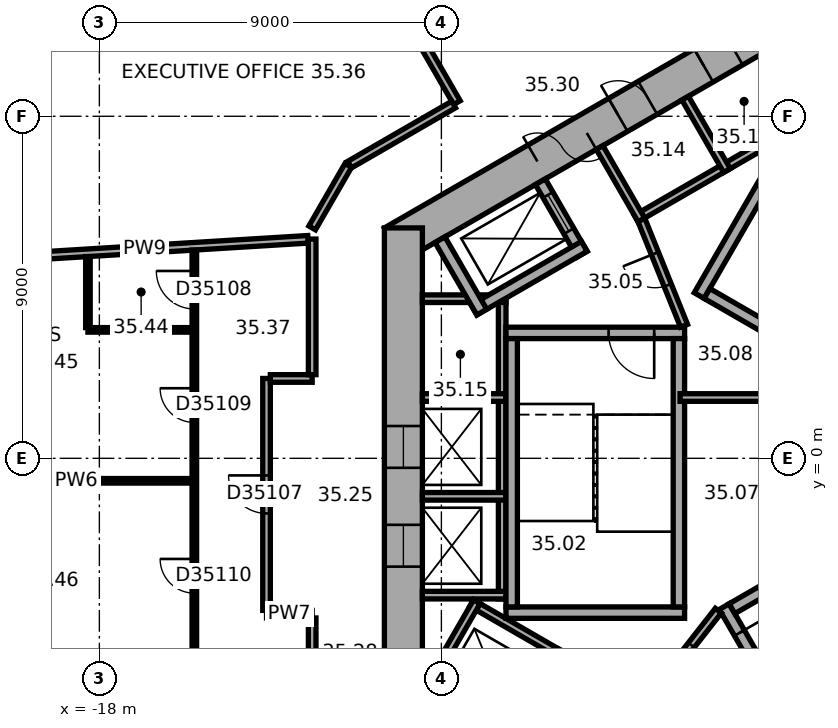
"""IFC4 building model, lengths in metres.
Left out: names, types, materials, properties, quantities, classifications, styles, units other than length and angle.
Written with IfcOpenShell. Run it as: python <this file> out.ifc"""

import sys

from ifc_helpers import new_model, si_unit, direction, frame, frame_2d, origin, place, context, subcontext, project, spatial, rectangle, extrude, element, fill, save


model = new_model("IFC4")
c1 = context("Model", 3, precision=1e-05, world=origin(), true_north=direction((0.0, 1.0)))
c2 = subcontext(c1, "Body", "Model", "MODEL_VIEW")
j1 = project(units=[si_unit("LENGTHUNIT", "METRE"), si_unit("PLANEANGLEUNIT", "RADIAN")], contexts=[c1])
p1 = place(None, origin())
s1 = spatial("IfcSite", under=j1, at=p1, CompositionType="ELEMENT")
p2 = place(p1, origin())
s2 = spatial("IfcBuilding", under=s1, at=p2, CompositionType="ELEMENT")
p3 = place(p2, frame((0.0, 0.0, 146.6)))
s3 = spatial("IfcBuildingStorey", under=s2, at=p3, CompositionType="ELEMENT", Elevation=146.6)
p4 = place(p3, frame((0.25, 11.691, 0.0), z_axis=(0.0, 0.0, 1.0), x_axis=(-0.866022616891, -0.50000482701, 0.0)))
e1 = element("IfcWall", 1, at=p4, inside=s3, PredefinedType="SHEAR", context=c2, shape_type="SweptSolid", body=[
    extrude(rectangle(XDim=12.125, YDim=1.0, at=frame_2d((6.062, 0.0))), origin(), (0.0, 0.0, 1.0), 3.7),
])
p5 = place(p4, frame((6.262, 0.0, 0.0)))
e2 = element("IfcOpeningElement", 2, at=p5, cuts=e1, PredefinedType="OPENING", context=c2, shape_type="SweptSolid", body=[
    extrude(rectangle(XDim=1.5, YDim=2.1, at=frame_2d((0.75, 1.05))), frame((0.0, 0.51, 0.0), z_axis=(0.0, -1.0, 0.0), x_axis=(1.0, 0.0, 0.0)), (0.0, 0.0, 1.0), 1.02),
])
p6 = place(p4, frame((1.812, 0.0, 0.0)))
e3 = element("IfcOpeningElement", 3, at=p6, cuts=e1, PredefinedType="OPENING", context=c2, shape_type="SweptSolid", body=[
    extrude(rectangle(XDim=0.9, YDim=2.1, at=frame_2d((0.45, 1.05))), frame((0.0, 0.51, 0.0), z_axis=(0.0, -1.0, 0.0), x_axis=(1.0, 0.0, 0.0)), (0.0, 0.0, 1.0), 1.02),
])
p7 = place(p4, frame((4.412, 0.0, 0.0)))
e4 = element("IfcOpeningElement", 4, at=p7, cuts=e1, PredefinedType="OPENING", context=c2, shape_type="SweptSolid", body=[
    extrude(rectangle(XDim=0.9, YDim=2.1, at=frame_2d((0.45, 1.05))), frame((0.0, 0.51, 0.0), z_axis=(0.0, -1.0, 0.0), x_axis=(1.0, 0.0, 0.0)), (0.0, 0.0, 1.0), 1.02),
])
p8 = place(p3, frame((-10.0, 6.062, 0.0), z_axis=(0.0, 0.0, 1.0), x_axis=(0.0, -1.0, 0.0)))
e5 = element("IfcWall", 5, at=p8, inside=s3, PredefinedType="SHEAR", context=c2, shape_type="SweptSolid", body=[
    extrude(rectangle(XDim=12.125, YDim=1.0, at=frame_2d((6.062, 0.0))), origin(), (0.0, 0.0, 1.0), 3.7),
])
p9 = place(p8, frame((5.212, 0.0, 0.0)))
e6 = element("IfcOpeningElement", 6, at=p9, cuts=e5, PredefinedType="OPENING", context=c2, shape_type="SweptSolid", body=[
    extrude(rectangle(XDim=1.1, YDim=2.1, at=frame_2d((0.55, 1.05))), frame((0.0, 0.51, 0.0), z_axis=(0.0, -1.0, 0.0), x_axis=(1.0, 0.0, 0.0)), (0.0, 0.0, 1.0), 1.02),
])
p10 = place(p8, frame((7.812, 0.0, 0.0)))
e7 = element("IfcOpeningElement", 7, at=p10, cuts=e5, PredefinedType="OPENING", context=c2, shape_type="SweptSolid", body=[
    extrude(rectangle(XDim=1.1, YDim=2.1, at=frame_2d((0.55, 1.05))), frame((0.0, 0.51, 0.0), z_axis=(0.0, -1.0, 0.0), x_axis=(1.0, 0.0, 0.0)), (0.0, 0.0, 1.0), 1.02),
])
p11 = place(p3, frame((0.803, 9.009, 0.0), z_axis=(0.0, 0.0, 1.0), x_axis=(-0.866028230842, -0.499995103361, 0.0)))
e8 = element("IfcWall", 8, at=p11, inside=s3, PredefinedType="PARTITIONING", context=c2, shape_type="SweptSolid", body=[
    extrude(rectangle(XDim=5.4, YDim=0.2, at=frame_2d((2.7, 0.0))), origin(), (0.0, 0.0, 1.0), 3.42),
])
for number, where, z_axis, x_axis in (
    (9, (-1.485, 7.572, 0.0), (0.0, 0.0, 1.0), (-0.5, 0.866, 0.0)),
    (10, (-3.737, 6.272, 0.0), (0.0, 0.0, 1.0), (-0.5, 0.866, 0.0)),
):
    element("IfcWall", number, at=place(p3, frame(where, z_axis=z_axis, x_axis=x_axis)), inside=s3, PredefinedType="PARTITIONING", context=c2, shape_type="SweptSolid", body=[
        extrude(rectangle(XDim=2.2, YDim=0.2, at=frame_2d((1.1, 0.0))), origin(), (0.0, 0.0, 1.0), 3.42),
    ])
p12 = place(p3, frame((-7.4, 4.3, 0.0), z_axis=(0.0, 0.0, 1.0), x_axis=(0.0, -1.0, 0.0)))
e11 = element("IfcWall", 11, at=p12, inside=s3, PredefinedType="PARTITIONING", context=c2, shape_type="SweptSolid", body=[
    extrude(rectangle(XDim=8.0, YDim=0.2, at=frame_2d((4.0, 0.0))), origin(), (0.0, 0.0, 1.0), 3.42),
])
for number, where, z_axis, x_axis in (
    (12, (-7.3, 4.2, 0.0), (0.0, 0.0, 1.0), (-1.0, 0.0, 0.0)),
    (13, (-7.3, 1.6, 0.0), (0.0, 0.0, 1.0), (-1.0, 0.0, 0.0)),
    (14, (-7.3, -1.0, 0.0), (0.0, 0.0, 1.0), (-1.0, 0.0, 0.0)),
    (15, (-7.3, -3.6, 0.0), (0.0, 0.0, 1.0), (-1.0, 0.0, 0.0)),
):
    element("IfcWall", number, at=place(p3, frame(where, z_axis=z_axis, x_axis=x_axis)), inside=s3, PredefinedType="PARTITIONING", context=c2, shape_type="SweptSolid", body=[
        extrude(rectangle(XDim=2.2, YDim=0.2, at=frame_2d((1.1, 0.0))), origin(), (0.0, 0.0, 1.0), 3.42),
    ])
p13 = place(p3, frame((-8.203, -3.809, 0.0), z_axis=(0.0, 0.0, 1.0), x_axis=(0.866028230842, -0.499995103361, 0.0)))
e16 = element("IfcWall", 16, at=p13, inside=s3, PredefinedType="PARTITIONING", context=c2, shape_type="SweptSolid", body=[
    extrude(rectangle(XDim=5.4, YDim=0.2, at=frame_2d((2.7, 0.0))), origin(), (0.0, 0.0, 1.0), 3.42),
])
p14 = place(p3, frame((-8.067, -3.772, 0.0), z_axis=(0.0, 0.0, 1.0), x_axis=(-0.50002983664, -0.866008176907, 0.0)))
e17 = element("IfcWall", 17, at=p14, inside=s3, PredefinedType="PARTITIONING", context=c2, shape_type="SweptSolid", body=[
    extrude(rectangle(XDim=2.2, YDim=0.2, at=frame_2d((1.1, 0.0))), origin(), (0.0, 0.0, 1.0), 3.42),
])
p15 = place(p3, frame((-2.216, 4.282, 0.0), z_axis=(0.0, 0.0, 1.0), x_axis=(0.499977259774, 0.866038532462, 0.0)))
e18 = element("IfcWall", 18, at=p15, inside=s3, PredefinedType="SHEAR", context=c2, shape_type="SweptSolid", body=[
    extrude(rectangle(XDim=4.7, YDim=0.3, at=frame_2d((2.35, 0.0))), origin(), (0.0, 0.0, 1.0), 3.42),
])
p16 = place(p3, frame((4.103, 0.807, 0.0), z_axis=(0.0, 0.0, 1.0), x_axis=(-0.866027801685, 0.499995846692, 0.0)))
e19 = element("IfcWall", 19, at=p16, inside=s3, PredefinedType="SHEAR", context=c2, shape_type="SweptSolid", body=[
    extrude(rectangle(XDim=7.06, YDim=0.3, at=frame_2d((3.53, 0.0))), origin(), (0.0, 0.0, 1.0), 3.42),
])
p17 = place(p3, frame((-2.6, 3.3, 0.0), z_axis=(0.0, 0.0, 1.0), x_axis=(-1.0, 0.0, 0.0)))
e20 = element("IfcWall", 20, at=p17, inside=s3, PredefinedType="SHEAR", context=c2, shape_type="SweptSolid", body=[
    extrude(rectangle(XDim=4.7, YDim=0.3, at=frame_2d((2.35, 0.0))), origin(), (0.0, 0.0, 1.0), 3.42),
])
p18 = place(p17, frame((0.8, 0.0, 0.0)))
e21 = element("IfcOpeningElement", 21, at=p18, cuts=e20, PredefinedType="OPENING", context=c2, shape_type="SweptSolid", body=[
    extrude(rectangle(XDim=1.2, YDim=2.1, at=frame_2d((0.6, 1.05))), frame((0.0, 0.16, 0.0), z_axis=(0.0, -1.0, 0.0), x_axis=(1.0, 0.0, 0.0)), (0.0, 0.0, 1.0), 0.32),
])
p19 = place(p3, frame((-2.6, -4.06, 0.0), z_axis=(0.0, 0.0, 1.0), x_axis=(-1.0, 0.0, 0.0)))
e22 = element("IfcWall", 22, at=p19, inside=s3, PredefinedType="SHEAR", context=c2, shape_type="SweptSolid", body=[
    extrude(rectangle(XDim=4.7, YDim=0.3, at=frame_2d((2.35, 0.0))), origin(), (0.0, 0.0, 1.0), 3.42),
])
for number, where, z_axis, x_axis in (
    (23, (-2.75, 3.15, 0.0), (0.0, 0.0, 1.0), (0.0, -1.0, 0.0)),
    (24, (-7.15, 3.15, 0.0), (0.0, 0.0, 1.0), (0.0, -1.0, 0.0)),
):
    element("IfcWall", number, at=place(p3, frame(where, z_axis=z_axis, x_axis=x_axis)), inside=s3, PredefinedType="SHEAR", context=c2, shape_type="SweptSolid", body=[
        extrude(rectangle(XDim=7.06, YDim=0.3, at=frame_2d((3.53, 0.0))), origin(), (0.0, 0.0, 1.0), 3.42),
    ])
p20 = place(p3, frame((-1.558, -3.902, 0.0), z_axis=(0.0, 0.0, 1.0), x_axis=(0.499977259774, -0.866038532462, 0.0)))
e25 = element("IfcWall", 25, at=p20, inside=s3, PredefinedType="SHEAR", context=c2, shape_type="SweptSolid", body=[
    extrude(rectangle(XDim=4.7, YDim=0.3, at=frame_2d((2.35, 0.0))), origin(), (0.0, 0.0, 1.0), 3.42),
])
p21 = place(p20, frame((0.8, 0.0, 0.0)))
e26 = element("IfcOpeningElement", 26, at=p21, cuts=e25, PredefinedType="OPENING", context=c2, shape_type="SweptSolid", body=[
    extrude(rectangle(XDim=1.2, YDim=2.1, at=frame_2d((0.6, 1.05))), frame((0.0, 0.16, 0.0), z_axis=(0.0, -1.0, 0.0), x_axis=(1.0, 0.0, 0.0)), (0.0, 0.0, 1.0), 0.32),
])
p22 = place(p3, frame((-1.353, -3.957, 0.0), z_axis=(0.0, 0.0, 1.0), x_axis=(0.866027801685, 0.499995846692, 0.0)))
e27 = element("IfcWall", 27, at=p22, inside=s3, PredefinedType="SHEAR", context=c2, shape_type="SweptSolid", body=[
    extrude(rectangle(XDim=7.06, YDim=0.3, at=frame_2d((3.53, 0.0))), origin(), (0.0, 0.0, 1.0), 3.42),
])
p23 = place(p3, frame((-5.295, 5.372, 0.0), z_axis=(0.0, 0.0, 1.0), x_axis=(-0.500077893725, 0.86598042715, 0.0)))
e28 = element("IfcWall", 28, at=p23, inside=s3, PredefinedType="SHEAR", context=c2, shape_type="SweptSolid", body=[
    extrude(rectangle(XDim=2.2, YDim=0.3, at=frame_2d((1.1, 0.0))), origin(), (0.0, 0.0, 1.0), 3.42),
])
p24 = place(p23, frame((0.7, 0.0, 0.0)))
e29 = element("IfcOpeningElement", 29, at=p24, cuts=e28, PredefinedType="OPENING", context=c2, shape_type="SweptSolid", body=[
    extrude(rectangle(XDim=1.1, YDim=2.1, at=frame_2d((0.55, 1.05))), frame((0.0, 0.16, 0.0), z_axis=(0.0, -1.0, 0.0), x_axis=(1.0, 0.0, 0.0)), (0.0, 0.0, 1.0), 0.32),
])
p25 = place(p3, frame((-5.24, 5.577, 0.0), z_axis=(0.0, 0.0, 1.0), x_axis=(-0.866014461049, -0.500018952895, 0.0)))
e30 = element("IfcWall", 30, at=p25, inside=s3, PredefinedType="SHEAR", context=c2, shape_type="SweptSolid", body=[
    extrude(rectangle(XDim=3.35, YDim=0.3, at=frame_2d((1.675, 0.0))), origin(), (0.0, 0.0, 1.0), 3.42),
])
p26 = place(p3, frame((-7.937, 3.847, 0.0), z_axis=(0.0, 0.0, 1.0), x_axis=(-0.50002983664, 0.866008176907, 0.0)))
e31 = element("IfcWall", 31, at=p26, inside=s3, PredefinedType="SHEAR", context=c2, shape_type="SweptSolid", body=[
    extrude(rectangle(XDim=2.2, YDim=0.3, at=frame_2d((1.1, 0.0))), origin(), (0.0, 0.0, 1.0), 3.42),
])
p27 = place(p3, frame((-2.615, 3.487, 0.0), z_axis=(0.0, 0.0, 1.0), x_axis=(-0.373576831041, 0.92759924068, 0.0)))
e32 = element("IfcWall", 32, at=p27, inside=s3, PredefinedType="PARTITIONING", context=c2, shape_type="SweptSolid", body=[
    extrude(rectangle(XDim=3.002, YDim=0.2, at=frame_2d((1.501, 0.0))), origin(), (0.0, 0.0, 1.0), 3.42),
])
p28 = place(p27, frame((1.15, 0.0, 0.0)))
e33 = element("IfcOpeningElement", 33, at=p28, cuts=e32, PredefinedType="OPENING", context=c2, shape_type="SweptSolid", body=[
    extrude(rectangle(XDim=0.9, YDim=2.1, at=frame_2d((0.45, 1.05))), frame((0.0, 0.11, 0.0), z_axis=(0.0, -1.0, 0.0), x_axis=(1.0, 0.0, 0.0)), (0.0, 0.0, 1.0), 0.22),
])
p29 = place(p3, frame((-1.712, -4.008, 0.0), z_axis=(0.0, 0.0, 1.0), x_axis=(-0.616549420702, -0.787316208287, 0.0)))
e34 = element("IfcWall", 34, at=p29, inside=s3, PredefinedType="PARTITIONING", context=c2, shape_type="SweptSolid", body=[
    extrude(rectangle(XDim=3.002, YDim=0.2, at=frame_2d((1.501, 0.0))), origin(), (0.0, 0.0, 1.0), 3.42),
])
p30 = place(p29, frame((1.15, 0.0, 0.0)))
e35 = element("IfcOpeningElement", 35, at=p30, cuts=e34, PredefinedType="OPENING", context=c2, shape_type="SweptSolid", body=[
    extrude(rectangle(XDim=0.9, YDim=2.1, at=frame_2d((0.45, 1.05))), frame((0.0, 0.11, 0.0), z_axis=(0.0, -1.0, 0.0), x_axis=(1.0, 0.0, 0.0)), (0.0, 0.0, 1.0), 0.22),
])
p31 = place(p3, frame((-2.72, 1.6, 0.0), z_axis=(0.0, 0.0, 1.0), x_axis=(1.0, 0.0, 0.0)))
e36 = element("IfcWall", 36, at=p31, inside=s3, PredefinedType="PARTITIONING", context=c2, shape_type="SweptSolid", body=[
    extrude(rectangle(XDim=5.269, YDim=0.2, at=frame_2d((2.634, 0.0))), origin(), (0.0, 0.0, 1.0), 3.42),
])
p32 = place(p3, frame((-21.654, -0.592, 0.0), z_axis=(0.0, 0.0, 1.0), x_axis=(1.0, 0.0, 0.0)))
e37 = element("IfcWall", 37, at=p32, inside=s3, PredefinedType="PARTITIONING", context=c2, shape_type="SweptSolid", body=[
    extrude(rectangle(XDim=6.093, YDim=0.12, at=frame_2d((3.046, 0.0))), origin(), (0.0, 0.0, 1.0), 3.42),
])
p33 = place(p3, frame((-21.109, 5.237, 0.0), z_axis=(0.0, 0.0, 1.0), x_axis=(0.998135264293, 0.061040922131, 0.0)))
e38 = element("IfcWall", 38, at=p33, inside=s3, PredefinedType="PARTITIONING", context=c2, shape_type="SweptSolid", body=[
    extrude(rectangle(XDim=8.615, YDim=0.2, at=frame_2d((4.308, 0.0))), origin(), (0.0, 0.0, 1.0), 3.42),
])
p34 = place(p3, frame((-18.301, 3.38, 0.0), z_axis=(0.0, 0.0, 1.0), x_axis=(1.0, 0.0, 0.0)))
e39 = element("IfcWall", 39, at=p34, inside=s3, PredefinedType="PARTITIONING", context=c2, shape_type="SweptSolid", body=[
    extrude(rectangle(XDim=2.74, YDim=0.12, at=frame_2d((1.37, 0.0))), origin(), (0.0, 0.0, 1.0), 3.42),
])
p35 = place(p3, frame((-18.301, 5.308, 0.0), z_axis=(0.0, 0.0, 1.0), x_axis=(0.0, -1.0, 0.0)))
e40 = element("IfcWall", 40, at=p35, inside=s3, PredefinedType="PARTITIONING", context=c2, shape_type="SweptSolid", body=[
    extrude(rectangle(XDim=1.869, YDim=0.12, at=frame_2d((0.934, 0.0))), origin(), (0.0, 0.0, 1.0), 3.42),
])
p36 = place(p3, frame((-15.501, 5.479, 0.0), z_axis=(0.0, 0.0, 1.0), x_axis=(0.0, -1.0, 0.0)))
e41 = element("IfcWall", 41, at=p36, inside=s3, PredefinedType="PARTITIONING", context=c2, shape_type="SweptSolid", body=[
    extrude(rectangle(XDim=11.083, YDim=0.12, at=frame_2d((5.542, 0.0))), origin(), (0.0, 0.0, 1.0), 3.42),
])
p37 = place(p36, frame((0.55, 0.0, 0.0)))
e42 = element("IfcOpeningElement", 42, at=p37, cuts=e41, PredefinedType="OPENING", context=c2, shape_type="SweptSolid", body=[
    extrude(rectangle(XDim=1.0, YDim=2.1, at=frame_2d((0.5, 1.05))), frame((0.0, 0.07, 0.0), z_axis=(0.0, -1.0, 0.0), x_axis=(1.0, 0.0, 0.0)), (0.0, 0.0, 1.0), 0.14),
])
p38 = place(p36, frame((3.636, 0.0, 0.0)))
e43 = element("IfcOpeningElement", 43, at=p38, cuts=e41, PredefinedType="OPENING", context=c2, shape_type="SweptSolid", body=[
    extrude(rectangle(XDim=0.9, YDim=2.1, at=frame_2d((0.45, 1.05))), frame((0.0, 0.07, 0.0), z_axis=(0.0, -1.0, 0.0), x_axis=(1.0, 0.0, 0.0)), (0.0, 0.0, 1.0), 0.14),
])
p39 = place(p36, frame((8.127, 0.0, 0.0)))
e44 = element("IfcOpeningElement", 44, at=p39, cuts=e41, PredefinedType="OPENING", context=c2, shape_type="SweptSolid", body=[
    extrude(rectangle(XDim=0.9, YDim=2.1, at=frame_2d((0.45, 1.05))), frame((0.0, 0.07, 0.0), z_axis=(0.0, -1.0, 0.0), x_axis=(1.0, 0.0, 0.0)), (0.0, 0.0, 1.0), 0.14),
])
p40 = place(p3, frame((-13.601, -4.101, 0.0), z_axis=(0.0, 0.0, 1.0), x_axis=(1.0, 0.0, 0.0)))
e45 = element("IfcWall", 45, at=p40, inside=s3, PredefinedType="PARTITIONING", context=c2, shape_type="SweptSolid", body=[
    extrude(rectangle(XDim=1.201, YDim=0.2, at=frame_2d((0.601, 0.0))), origin(), (0.0, 0.0, 1.0), 3.42),
])
p41 = place(p3, frame((-13.601, 2.101, 0.0), z_axis=(0.0, 0.0, 1.0), x_axis=(0.0, -1.0, 0.0)))
e46 = element("IfcWall", 46, at=p41, inside=s3, PredefinedType="PARTITIONING", context=c2, shape_type="SweptSolid", body=[
    extrude(rectangle(XDim=6.102, YDim=0.2, at=frame_2d((3.051, 0.0))), origin(), (0.0, 0.0, 1.0), 3.42),
])
p42 = place(p41, frame((2.551, 0.0, 0.0)))
e47 = element("IfcOpeningElement", 47, at=p42, cuts=e46, PredefinedType="OPENING", context=c2, shape_type="SweptSolid", body=[
    extrude(rectangle(XDim=1.0, YDim=2.1, at=frame_2d((0.5, 1.05))), frame((0.0, 0.11, 0.0), z_axis=(0.0, -1.0, 0.0), x_axis=(1.0, 0.0, 0.0)), (0.0, 0.0, 1.0), 0.22),
])
p43 = place(p3, frame((-12.766, 16.589, 0.0), z_axis=(0.0, 0.0, 1.0), x_axis=(0.500010139422, -0.866019549707, 0.0)))
e48 = element("IfcWall", 48, at=p43, inside=s3, PredefinedType="PARTITIONING", context=c2, shape_type="SweptSolid", body=[
    extrude(rectangle(XDim=8.35, YDim=0.2, at=frame_2d((4.175, 0.0))), origin(), (0.0, 0.0, 1.0), 3.42),
])
p44 = place(p43, frame((3.675, 0.0, 0.0)))
e49 = element("IfcOpeningElement", 49, at=p44, cuts=e48, PredefinedType="OPENING", context=c2, shape_type="SweptSolid", body=[
    extrude(rectangle(XDim=1.0, YDim=2.1, at=frame_2d((0.5, 1.05))), frame((0.0, 0.11, 0.0), z_axis=(0.0, -1.0, 0.0), x_axis=(1.0, 0.0, 0.0)), (0.0, 0.0, 1.0), 0.22),
])
p45 = place(p3, frame((-12.4, -4.201, 0.0), z_axis=(0.0, 0.0, 1.0), x_axis=(0.0, -1.0, 0.0)))
e50 = element("IfcWall", 50, at=p45, inside=s3, PredefinedType="PARTITIONING", context=c2, shape_type="SweptSolid", body=[
    extrude(rectangle(XDim=1.821, YDim=0.2, at=frame_2d((0.911, 0.0))), origin(), (0.0, 0.0, 1.0), 3.42),
])
p46 = place(p3, frame((-12.4, 2.101, 0.0), z_axis=(0.0, 0.0, 1.0), x_axis=(-1.0, 0.0, 0.0)))
e51 = element("IfcWall", 51, at=p46, inside=s3, PredefinedType="PARTITIONING", context=c2, shape_type="SweptSolid", body=[
    extrude(rectangle(XDim=1.101, YDim=0.2, at=frame_2d((0.551, 0.0))), origin(), (0.0, 0.0, 1.0), 3.42),
])
p47 = place(p3, frame((-12.4, 5.769, 0.0), z_axis=(0.0, 0.0, 1.0), x_axis=(0.0, -1.0, 0.0)))
e52 = element("IfcWall", 52, at=p47, inside=s3, PredefinedType="PARTITIONING", context=c2, shape_type="SweptSolid", body=[
    extrude(rectangle(XDim=3.568, YDim=0.2, at=frame_2d((1.784, 0.0))), origin(), (0.0, 0.0, 1.0), 3.42),
])
p48 = place(p3, frame((-11.45, 7.708, 0.0), z_axis=(0.0, 0.0, 1.0), x_axis=(-0.500022797313, -0.86601224135, 0.0)))
e53 = element("IfcWall", 53, at=p48, inside=s3, PredefinedType="PARTITIONING", context=c2, shape_type="SweptSolid", body=[
    extrude(rectangle(XDim=1.9, YDim=0.2, at=frame_2d((0.95, 0.0))), origin(), (0.0, 0.0, 1.0), 3.42),
])
p49 = place(p3, frame((-8.678, 9.308, 0.0), z_axis=(0.0, 0.0, 1.0), x_axis=(-0.866000359435, -0.500043375578, 0.0)))
e54 = element("IfcWall", 54, at=p49, inside=s3, PredefinedType="PARTITIONING", context=c2, shape_type="SweptSolid", body=[
    extrude(rectangle(XDim=3.161, YDim=0.2, at=frame_2d((1.581, 0.0))), origin(), (0.0, 0.0, 1.0), 3.42),
])
p50 = place(p5, origin())
e55 = element("IfcDoor", 55, at=p50, inside=s3, OperationType="DOUBLE_DOOR_SINGLE_SWING", PredefinedType="DOOR", context=c2, shape_type="SweptSolid", body=[
    extrude(rectangle(XDim=1.5, YDim=2.1, at=frame_2d((0.75, 1.05))), frame((0.0, 0.025, 0.0), z_axis=(0.0, -1.0, 0.0), x_axis=(1.0, 0.0, 0.0)), (0.0, 0.0, 1.0), 0.05),
])
fill(e2, e55)
p51 = place(p18, origin())
e56 = element("IfcDoor", 56, at=p51, inside=s3, OperationType="SINGLE_SWING_RIGHT", PredefinedType="DOOR", context=c2, shape_type="SweptSolid", body=[
    extrude(rectangle(XDim=1.2, YDim=2.1, at=frame_2d((0.6, 1.05))), frame((0.0, 0.025, 0.0), z_axis=(0.0, -1.0, 0.0), x_axis=(1.0, 0.0, 0.0)), (0.0, 0.0, 1.0), 0.05),
])
fill(e21, e56)
p52 = place(p21, origin())
e57 = element("IfcDoor", 57, at=p52, inside=s3, OperationType="SINGLE_SWING_RIGHT", PredefinedType="DOOR", context=c2, shape_type="SweptSolid", body=[
    extrude(rectangle(XDim=1.2, YDim=2.1, at=frame_2d((0.6, 1.05))), frame((0.0, 0.025, 0.0), z_axis=(0.0, -1.0, 0.0), x_axis=(1.0, 0.0, 0.0)), (0.0, 0.0, 1.0), 0.05),
])
fill(e26, e57)
p53 = place(p28, origin())
e58 = element("IfcDoor", 58, at=p53, inside=s3, OperationType="SINGLE_SWING_LEFT", PredefinedType="DOOR", context=c2, shape_type="SweptSolid", body=[
    extrude(rectangle(XDim=0.9, YDim=2.1, at=frame_2d((0.45, 1.05))), frame((0.0, 0.025, 0.0), z_axis=(0.0, -1.0, 0.0), x_axis=(1.0, 0.0, 0.0)), (0.0, 0.0, 1.0), 0.05),
])
fill(e33, e58)
p54 = place(p30, origin())
e59 = element("IfcDoor", 59, at=p54, inside=s3, OperationType="SINGLE_SWING_LEFT", PredefinedType="DOOR", context=c2, shape_type="SweptSolid", body=[
    extrude(rectangle(XDim=0.9, YDim=2.1, at=frame_2d((0.45, 1.05))), frame((0.0, 0.025, 0.0), z_axis=(0.0, -1.0, 0.0), x_axis=(1.0, 0.0, 0.0)), (0.0, 0.0, 1.0), 0.05),
])
fill(e35, e59)
p55 = place(p6, origin())
e60 = element("IfcDoor", 60, at=p55, inside=s3, OperationType="SINGLE_SWING_LEFT", PredefinedType="DOOR", context=c2, shape_type="SweptSolid", body=[
    extrude(rectangle(XDim=0.9, YDim=2.1, at=frame_2d((0.45, 1.05))), frame((0.0, 0.025, 0.0), z_axis=(0.0, -1.0, 0.0), x_axis=(1.0, 0.0, 0.0)), (0.0, 0.0, 1.0), 0.05),
])
fill(e3, e60)
p56 = place(p7, origin())
e61 = element("IfcDoor", 61, at=p56, inside=s3, OperationType="SINGLE_SWING_LEFT", PredefinedType="DOOR", context=c2, shape_type="SweptSolid", body=[
    extrude(rectangle(XDim=0.9, YDim=2.1, at=frame_2d((0.45, 1.05))), frame((0.0, 0.025, 0.0), z_axis=(0.0, -1.0, 0.0), x_axis=(1.0, 0.0, 0.0)), (0.0, 0.0, 1.0), 0.05),
])
fill(e4, e61)
p57 = place(p24, origin())
e62 = element("IfcDoor", 62, at=p57, inside=s3, OperationType="DOUBLE_DOOR_SLIDING", PredefinedType="DOOR", context=c2, shape_type="SweptSolid", body=[
    extrude(rectangle(XDim=1.1, YDim=2.1, at=frame_2d((0.55, 1.05))), frame((0.0, 0.025, 0.0), z_axis=(0.0, -1.0, 0.0), x_axis=(1.0, 0.0, 0.0)), (0.0, 0.0, 1.0), 0.05),
])
fill(e29, e62)
p58 = place(p9, origin())
e63 = element("IfcDoor", 63, at=p58, inside=s3, OperationType="DOUBLE_DOOR_SLIDING", PredefinedType="DOOR", context=c2, shape_type="SweptSolid", body=[
    extrude(rectangle(XDim=1.1, YDim=2.1, at=frame_2d((0.55, 1.05))), frame((0.0, 0.025, 0.0), z_axis=(0.0, -1.0, 0.0), x_axis=(1.0, 0.0, 0.0)), (0.0, 0.0, 1.0), 0.05),
])
fill(e6, e63)
p59 = place(p10, origin())
e64 = element("IfcDoor", 64, at=p59, inside=s3, OperationType="DOUBLE_DOOR_SLIDING", PredefinedType="DOOR", context=c2, shape_type="SweptSolid", body=[
    extrude(rectangle(XDim=1.1, YDim=2.1, at=frame_2d((0.55, 1.05))), frame((0.0, 0.025, 0.0), z_axis=(0.0, -1.0, 0.0), x_axis=(1.0, 0.0, 0.0)), (0.0, 0.0, 1.0), 0.05),
])
fill(e7, e64)
p60 = place(p42, origin())
e65 = element("IfcDoor", 65, at=p60, inside=s3, OperationType="SINGLE_SWING_LEFT", PredefinedType="DOOR", context=c2, shape_type="SweptSolid", body=[
    extrude(rectangle(XDim=1.0, YDim=2.1, at=frame_2d((0.5, 1.05))), frame((0.0, 0.025, 0.0), z_axis=(0.0, -1.0, 0.0), x_axis=(1.0, 0.0, 0.0)), (0.0, 0.0, 1.0), 0.05),
])
fill(e47, e65)
p61 = place(p37, origin())
e66 = element("IfcDoor", 66, at=p61, inside=s3, OperationType="SINGLE_SWING_LEFT", PredefinedType="DOOR", context=c2, shape_type="SweptSolid", body=[
    extrude(rectangle(XDim=1.0, YDim=2.1, at=frame_2d((0.5, 1.05))), frame((0.0, 0.025, 0.0), z_axis=(0.0, -1.0, 0.0), x_axis=(1.0, 0.0, 0.0)), (0.0, 0.0, 1.0), 0.05),
])
fill(e42, e66)
p62 = place(p38, origin())
e67 = element("IfcDoor", 67, at=p62, inside=s3, OperationType="SINGLE_SWING_LEFT", PredefinedType="DOOR", context=c2, shape_type="SweptSolid", body=[
    extrude(rectangle(XDim=0.9, YDim=2.1, at=frame_2d((0.45, 1.05))), frame((0.0, 0.025, 0.0), z_axis=(0.0, -1.0, 0.0), x_axis=(1.0, 0.0, 0.0)), (0.0, 0.0, 1.0), 0.05),
])
fill(e43, e67)
p63 = place(p39, origin())
e68 = element("IfcDoor", 68, at=p63, inside=s3, OperationType="SINGLE_SWING_LEFT", PredefinedType="DOOR", context=c2, shape_type="SweptSolid", body=[
    extrude(rectangle(XDim=0.9, YDim=2.1, at=frame_2d((0.45, 1.05))), frame((0.0, 0.025, 0.0), z_axis=(0.0, -1.0, 0.0), x_axis=(1.0, 0.0, 0.0)), (0.0, 0.0, 1.0), 0.05),
])
fill(e44, e68)
save(model, sys.argv[1])
